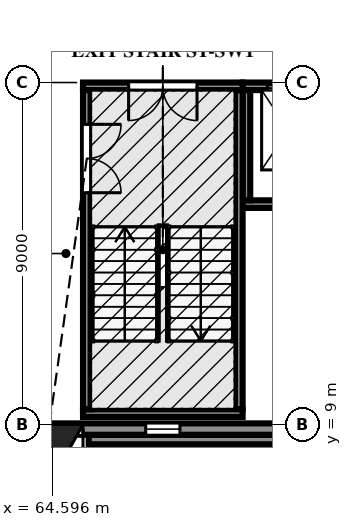
"""IFC4 building model, lengths in metres.
Left out: names, types, materials, properties, quantities, classifications, styles, units other than length and angle.
Written with IfcOpenShell. Run it as: python <this file> out.ifc"""

import sys

from ifc_helpers import new_model, si_unit, direction, frame, frame_2d, origin, place, context, subcontext, project, spatial, polyline, rectangle, outline, extrude, element, fill, save


model = new_model("IFC4")
c1 = context("Model", 3, precision=1e-05, world=origin(), true_north=direction((0.0, 1.0)))
c2 = subcontext(c1, "Body", "Model", "MODEL_VIEW")
j1 = project(units=[si_unit("LENGTHUNIT", "METRE"), si_unit("PLANEANGLEUNIT", "RADIAN")], contexts=[c1])
p1 = place(None, origin())
s1 = spatial("IfcSite", under=j1, at=p1, CompositionType="ELEMENT")
p2 = place(p1, origin())
s2 = spatial("IfcBuilding", under=s1, at=p2, CompositionType="ELEMENT")
p3 = place(p2, origin())
s3 = spatial("IfcBuildingStorey", under=s2, at=p3, CompositionType="ELEMENT", Elevation=0.0)
p4 = place(p3, frame((63.127, 8.88, 0.0), z_axis=(0.0, 0.0, 1.0), x_axis=(1.0, 0.0, 0.0)))
e1 = element("IfcWall", 1, at=p4, inside=s3, PredefinedType="SOLIDWALL", context=c2, shape_type="SweptSolid", body=[
    extrude(rectangle(XDim=8.746, YDim=0.3, at=frame_2d((4.373, 0.0))), origin(), (0.0, 0.0, 1.0), 6.767),
])
p5 = place(p4, frame((0.473, 0.0, 0.0)))
e2 = element("IfcOpeningElement", 2, at=p5, cuts=e1, PredefinedType="OPENING", context=c2, shape_type="SweptSolid", body=[
    extrude(rectangle(XDim=1.8, YDim=2.4, at=frame_2d((0.9, 1.2))), frame((0.0, 0.16, 0.0), z_axis=(0.0, -1.0, 0.0), x_axis=(1.0, 0.0, 0.0)), (0.0, 0.0, 1.0), 0.32),
])
p6 = place(p4, frame((0.773, 0.0, 2.55)))
e3 = element("IfcOpeningElement", 3, at=p6, cuts=e1, PredefinedType="OPENING", context=c2, shape_type="SweptSolid", body=[
    extrude(rectangle(XDim=1.2, YDim=0.6, at=frame_2d((0.6, 0.3))), frame((0.0, 0.16, 0.0), z_axis=(0.0, -1.0, 0.0), x_axis=(1.0, 0.0, 0.0)), (0.0, 0.0, 1.0), 0.32),
])
p7 = place(p4, frame((3.923, 0.0, 1.2)))
e4 = element("IfcOpeningElement", 4, at=p7, cuts=e1, PredefinedType="OPENING", context=c2, shape_type="SweptSolid", body=[
    extrude(rectangle(XDim=0.9, YDim=1.8, at=frame_2d((0.45, 0.9))), frame((0.0, 0.16, 0.0), z_axis=(0.0, -1.0, 0.0), x_axis=(1.0, 0.0, 0.0)), (0.0, 0.0, 1.0), 0.32),
])
p8 = place(p3, frame((65.55, 8.605, 0.0), z_axis=(0.0, 0.0, 1.0), x_axis=(1.0, 0.0, 0.0)))
e5 = element("IfcWall", 5, at=p8, inside=s3, PredefinedType="SOLIDWALL", context=c2, shape_type="SweptSolid", body=[
    extrude(outline(polyline([(0.0, 0.0), (6.577, 0.0), (6.577, 6.767), (0.0, 6.767), (0.0, 0.0)]), holes=[polyline([(1.35, 1.05), (1.35, 3.0), (1.374, 3.252), (1.47, 3.468), (1.554, 3.522), (1.626, 3.666), (1.782, 3.81), (1.95, 3.9), (2.118, 3.81), (2.274, 3.666), (2.346, 3.522), (2.43, 3.468), (2.526, 3.252), (2.55, 3.0), (2.55, 1.05), (1.35, 1.05)])]), frame((0.0, 0.125, 0.0), z_axis=(0.0, -1.0, 0.0), x_axis=(1.0, 0.0, 0.0)), (0.0, 0.0, 1.0), 0.25),
])
p9 = place(p3, frame((65.4, 9.3, 0.0), z_axis=(0.0, 0.0, 1.0), x_axis=(1.0, 0.0, 0.0)))
e6 = element("IfcWall", 6, at=p9, inside=s3, PredefinedType="SOLIDWALL", context=c2, shape_type="SweptSolid", body=[
    extrude(rectangle(XDim=4.2, YDim=0.2, at=frame_2d((2.1, 0.0))), origin(), (0.0, 0.0, 1.0), 6.757),
])
p10 = place(p3, frame((65.4, 17.9, 0.0), z_axis=(0.0, 0.0, 1.0), x_axis=(1.0, 0.0, 0.0)))
e7 = element("IfcWall", 7, at=p10, inside=s3, PredefinedType="SOLIDWALL", context=c2, shape_type="SweptSolid", body=[
    extrude(rectangle(XDim=4.2, YDim=0.2, at=frame_2d((2.1, 0.0))), origin(), (0.0, 0.0, 1.0), 6.757),
])
p11 = place(p10, frame((1.2, 0.0, 0.0)))
e8 = element("IfcOpeningElement", 8, at=p11, cuts=e7, PredefinedType="OPENING", context=c2, shape_type="SweptSolid", body=[
    extrude(rectangle(XDim=1.8, YDim=2.1, at=frame_2d((0.9, 1.05))), frame((0.0, 0.11, 0.0), z_axis=(0.0, -1.0, 0.0), x_axis=(1.0, 0.0, 0.0)), (0.0, 0.0, 1.0), 0.22),
])
p12 = place(p3, frame((65.5, 9.4, 0.0), z_axis=(0.0, 0.0, 1.0), x_axis=(0.0, 1.0, 0.0)))
e9 = element("IfcWall", 9, at=p12, inside=s3, PredefinedType="SOLIDWALL", context=c2, shape_type="SweptSolid", body=[
    extrude(rectangle(XDim=8.4, YDim=0.2, at=frame_2d((4.2, 0.0))), origin(), (0.0, 0.0, 1.0), 6.757),
])
p13 = place(p12, frame((5.7, 0.0, 0.0)))
e10 = element("IfcOpeningElement", 10, at=p13, cuts=e9, PredefinedType="OPENING", context=c2, shape_type="SweptSolid", body=[
    extrude(rectangle(XDim=1.8, YDim=2.1, at=frame_2d((0.9, 1.05))), frame((0.0, 0.11, 0.0), z_axis=(0.0, -1.0, 0.0), x_axis=(1.0, 0.0, 0.0)), (0.0, 0.0, 1.0), 0.22),
])
p14 = place(p3, frame((69.5, 9.4, 0.0), z_axis=(0.0, 0.0, 1.0), x_axis=(0.0, 1.0, 0.0)))
e11 = element("IfcWall", 11, at=p14, inside=s3, PredefinedType="SOLIDWALL", context=c2, shape_type="SweptSolid", body=[
    extrude(rectangle(XDim=8.4, YDim=0.2, at=frame_2d((4.2, 0.0))), origin(), (0.0, 0.0, 1.0), 6.757),
])
p15 = place(p3, frame((69.602, 14.8, -1.6), z_axis=(0.0, 0.0, 1.0), x_axis=(1.0, 0.0, 0.0)))
e12 = element("IfcWall", 12, at=p15, inside=s3, PredefinedType="SOLIDWALL", context=c2, shape_type="SweptSolid", body=[
    extrude(rectangle(XDim=2.398, YDim=0.2, at=frame_2d((1.199, 0.0))), origin(), (0.0, 0.0, 1.0), 8.357),
])
p16 = place(p3, frame((69.602, 17.9, -1.6), z_axis=(0.0, 0.0, 1.0), x_axis=(1.0, 0.0, 0.0)))
e13 = element("IfcWall", 13, at=p16, inside=s3, PredefinedType="SOLIDWALL", context=c2, shape_type="SweptSolid", body=[
    extrude(rectangle(XDim=2.398, YDim=0.2, at=frame_2d((1.199, 0.0))), origin(), (0.0, 0.0, 1.0), 8.357),
])
p17 = place(p16, frame((0.648, 0.0, 1.6)))
e14 = element("IfcOpeningElement", 14, at=p17, cuts=e13, PredefinedType="OPENING", context=c2, shape_type="SweptSolid", body=[
    extrude(rectangle(XDim=1.1, YDim=2.1, at=frame_2d((0.55, 1.05))), frame((0.0, 0.11, 0.0), z_axis=(0.0, -1.0, 0.0), x_axis=(1.0, 0.0, 0.0)), (0.0, 0.0, 1.0), 0.22),
])
p18 = place(p3, frame((69.7, 14.9, -1.6), z_axis=(0.0, 0.0, 1.0), x_axis=(0.0, 1.0, 0.0)))
e15 = element("IfcWall", 15, at=p18, inside=s3, PredefinedType="SOLIDWALL", context=c2, shape_type="SweptSolid", body=[
    extrude(rectangle(XDim=2.9, YDim=0.2, at=frame_2d((1.45, 0.0))), origin(), (0.0, 0.0, 1.0), 8.357),
])
p19 = place(p5, frame((1.8, 0.0, 0.0), z_axis=(0.0, 0.0, 1.0), x_axis=(-1.0, 0.0, 0.0)))
e16 = element("IfcDoor", 16, at=p19, inside=s3, OperationType="DOUBLE_DOOR_SINGLE_SWING", PredefinedType="DOOR", context=c2, shape_type="SweptSolid", body=[
    extrude(outline(polyline([(0.0, 0.0), (0.07, 0.0), (0.07, 2.33), (1.73, 2.33), (1.73, 0.0), (1.8, 0.0), (1.8, 2.4), (0.0, 2.4), (0.0, 0.0)])), frame((0.0, 0.025, 0.0), z_axis=(0.0, -1.0, 0.0), x_axis=(1.0, 0.0, 0.0)), (0.0, 0.0, 1.0), 0.05),
    extrude(outline(polyline([(0.074, 0.01), (0.897, 0.01), (0.897, 2.326), (0.074, 2.326), (0.074, 0.01)]), holes=[polyline([(0.194, 0.16), (0.777, 0.16), (0.777, 1.01), (0.194, 1.01), (0.194, 0.16)]), polyline([(0.335, 1.16), (0.635, 1.16), (0.635, 1.76), (0.335, 1.76), (0.335, 1.16)])]), frame((0.0, 0.017, 0.0), z_axis=(0.0, -1.0, 0.0), x_axis=(1.0, 0.0, 0.0)), (0.0, 0.0, 1.0), 0.035),
    extrude(rectangle(XDim=0.583, YDim=0.85, at=frame_2d((0.485, 0.585))), frame((0.0, 0.009, 0.0), z_axis=(0.0, -1.0, 0.0), x_axis=(1.0, 0.0, 0.0)), (0.0, 0.0, 1.0), 0.017),
    extrude(rectangle(XDim=0.3, YDim=0.6, at=frame_2d((0.485, 1.46))), frame((0.0, 0.006, 0.0), z_axis=(0.0, -1.0, 0.0), x_axis=(1.0, 0.0, 0.0)), (0.0, 0.0, 1.0), 0.012),
    extrude(outline(polyline([(0.903, 0.01), (1.726, 0.01), (1.726, 2.326), (0.903, 2.326), (0.903, 0.01)]), holes=[polyline([(1.023, 0.16), (1.606, 0.16), (1.606, 1.01), (1.023, 1.01), (1.023, 0.16)]), polyline([(1.165, 1.16), (1.465, 1.16), (1.465, 1.76), (1.165, 1.76), (1.165, 1.16)])]), frame((0.0, 0.017, 0.0), z_axis=(0.0, -1.0, 0.0), x_axis=(1.0, 0.0, 0.0)), (0.0, 0.0, 1.0), 0.035),
    extrude(rectangle(XDim=0.583, YDim=0.85, at=frame_2d((1.314, 0.585))), frame((0.0, 0.009, 0.0), z_axis=(0.0, -1.0, 0.0), x_axis=(1.0, 0.0, 0.0)), (0.0, 0.0, 1.0), 0.017),
    extrude(rectangle(XDim=0.3, YDim=0.6, at=frame_2d((1.314, 1.46))), frame((0.0, 0.006, 0.0), z_axis=(0.0, -1.0, 0.0), x_axis=(1.0, 0.0, 0.0)), (0.0, 0.0, 1.0), 0.012),
])
fill(e2, e16)
p20 = place(p6, origin())
e17 = element("IfcWindow", 17, at=p20, inside=s3, PartitioningType="SINGLE_PANEL", PredefinedType="WINDOW", context=c2, shape_type="SweptSolid", body=[
    extrude(outline(polyline([(0.0, 0.0), (1.2, 0.0), (1.2, 0.6), (0.0, 0.6), (0.0, 0.0)]), holes=[polyline([(0.07, 0.07), (1.13, 0.07), (1.13, 0.53), (0.07, 0.53), (0.07, 0.07)])]), frame((0.0, 0.03, 0.0), z_axis=(0.0, -1.0, 0.0), x_axis=(1.0, 0.0, 0.0)), (0.0, 0.0, 1.0), 0.06),
    extrude(outline(polyline([(0.07, 0.07), (1.13, 0.07), (1.13, 0.53), (0.07, 0.53), (0.07, 0.07)]), holes=[polyline([(0.1, 0.1), (1.1, 0.1), (1.1, 0.5), (0.1, 0.5), (0.1, 0.1)])]), frame((0.0, 0.022, 0.0), z_axis=(0.0, -1.0, 0.0), x_axis=(1.0, 0.0, 0.0)), (0.0, 0.0, 1.0), 0.045),
    extrude(rectangle(XDim=1.0, YDim=0.4, at=frame_2d((0.6, 0.3))), frame((0.0, 0.006, 0.0), z_axis=(0.0, -1.0, 0.0), x_axis=(1.0, 0.0, 0.0)), (0.0, 0.0, 1.0), 0.012),
])
fill(e3, e17)
p21 = place(p7, origin())
e18 = element("IfcWindow", 18, at=p21, inside=s3, PartitioningType="SINGLE_PANEL", PredefinedType="WINDOW", context=c2, shape_type="SweptSolid", body=[
    extrude(outline(polyline([(0.0, 0.0), (0.9, 0.0), (0.9, 1.235), (0.896, 1.3), (0.885, 1.364), (0.867, 1.426), (0.843, 1.486), (0.811, 1.543), (0.774, 1.596), (0.73, 1.645), (0.682, 1.688), (0.629, 1.726), (0.572, 1.757), (0.512, 1.782), (0.45, 1.8), (0.387, 1.782), (0.328, 1.757), (0.271, 1.726), (0.218, 1.688), (0.169, 1.645), (0.126, 1.596), (0.089, 1.543), (0.057, 1.486), (0.032, 1.426), (0.014, 1.364), (0.004, 1.3), (0.0, 1.235), (0.0, 0.0)]), holes=[polyline([(0.07, 0.07), (0.83, 0.07), (0.83, 1.235), (0.827, 1.291), (0.818, 1.346), (0.803, 1.4), (0.782, 1.451), (0.755, 1.501), (0.724, 1.547), (0.688, 1.589), (0.647, 1.627), (0.602, 1.661), (0.554, 1.689), (0.503, 1.713), (0.45, 1.73), (0.397, 1.713), (0.346, 1.689), (0.298, 1.661), (0.253, 1.627), (0.212, 1.589), (0.176, 1.547), (0.145, 1.501), (0.118, 1.451), (0.097, 1.4), (0.082, 1.346), (0.073, 1.291), (0.07, 1.235), (0.07, 0.07)])]), frame((0.0, 0.03, 0.0), z_axis=(0.0, -1.0, 0.0), x_axis=(1.0, 0.0, 0.0)), (0.0, 0.0, 1.0), 0.06),
    extrude(outline(polyline([(0.0, 1.235), (0.004, 1.3), (0.014, 1.364), (0.032, 1.426), (0.057, 1.486), (0.089, 1.543), (0.126, 1.596), (0.169, 1.645), (0.218, 1.688), (0.271, 1.726), (0.328, 1.757), (0.387, 1.782), (0.45, 1.8), (0.0, 1.8), (0.0, 1.235)])), frame((0.0, 0.028, 0.0), z_axis=(0.0, -1.0, 0.0), x_axis=(1.0, 0.0, 0.0)), (0.0, 0.0, 1.0), 0.056),
    extrude(outline(polyline([(0.45, 1.8), (0.512, 1.782), (0.572, 1.757), (0.629, 1.726), (0.682, 1.688), (0.73, 1.645), (0.774, 1.596), (0.811, 1.543), (0.843, 1.486), (0.867, 1.426), (0.885, 1.364), (0.896, 1.3), (0.9, 1.235), (0.9, 1.8), (0.45, 1.8)])), frame((0.0, 0.027, 0.0), z_axis=(0.0, -1.0, 0.0), x_axis=(1.0, 0.0, 0.0)), (0.0, 0.0, 1.0), 0.054),
    extrude(outline(polyline([(0.828, 1.275), (0.072, 1.275), (0.07, 1.235), (0.07, 1.195), (0.83, 1.195), (0.83, 1.235), (0.828, 1.275)])), frame((0.0, 0.021, 0.0), z_axis=(0.0, -1.0, 0.0), x_axis=(1.0, 0.0, 0.0)), (0.0, 0.0, 1.0), 0.042),
    extrude(outline(polyline([(0.07, 0.07), (0.83, 0.07), (0.83, 1.195), (0.07, 1.195), (0.07, 0.07)]), holes=[polyline([(0.1, 0.1), (0.8, 0.1), (0.8, 1.165), (0.1, 1.165), (0.1, 0.1)])]), frame((0.0, 0.022, 0.0), z_axis=(0.0, -1.0, 0.0), x_axis=(1.0, 0.0, 0.0)), (0.0, 0.0, 1.0), 0.045),
    extrude(rectangle(XDim=0.7, YDim=1.065, at=frame_2d((0.45, 0.632))), frame((0.0, 0.006, 0.0), z_axis=(0.0, -1.0, 0.0), x_axis=(1.0, 0.0, 0.0)), (0.0, 0.0, 1.0), 0.012),
    extrude(outline(polyline([(0.072, 1.275), (0.828, 1.275), (0.827, 1.291), (0.818, 1.346), (0.803, 1.4), (0.782, 1.451), (0.755, 1.501), (0.724, 1.547), (0.688, 1.589), (0.647, 1.627), (0.602, 1.661), (0.554, 1.689), (0.503, 1.713), (0.45, 1.73), (0.397, 1.713), (0.346, 1.689), (0.298, 1.661), (0.253, 1.627), (0.212, 1.589), (0.176, 1.547), (0.145, 1.501), (0.118, 1.451), (0.097, 1.4), (0.082, 1.346), (0.073, 1.291), (0.072, 1.275)]), holes=[polyline([(0.112, 1.31), (0.116, 1.338), (0.13, 1.388), (0.15, 1.437), (0.175, 1.483), (0.204, 1.526), (0.238, 1.565), (0.276, 1.601), (0.317, 1.632), (0.362, 1.658), (0.409, 1.68), (0.45, 1.693), (0.49, 1.68), (0.538, 1.658), (0.583, 1.632), (0.624, 1.601), (0.662, 1.565), (0.696, 1.526), (0.725, 1.483), (0.75, 1.437), (0.77, 1.388), (0.783, 1.338), (0.788, 1.31), (0.112, 1.31)])]), frame((0.0, 0.022, 0.0), z_axis=(0.0, -1.0, 0.0), x_axis=(1.0, 0.0, 0.0)), (0.0, 0.0, 1.0), 0.045),
    extrude(outline(polyline([(0.788, 1.31), (0.783, 1.338), (0.77, 1.388), (0.75, 1.437), (0.725, 1.483), (0.696, 1.526), (0.662, 1.565), (0.624, 1.601), (0.583, 1.632), (0.538, 1.658), (0.49, 1.68), (0.45, 1.693), (0.409, 1.68), (0.362, 1.658), (0.317, 1.632), (0.276, 1.601), (0.238, 1.565), (0.204, 1.526), (0.175, 1.483), (0.15, 1.437), (0.13, 1.388), (0.116, 1.338), (0.112, 1.31), (0.788, 1.31)])), frame((0.0, 0.006, 0.0), z_axis=(0.0, -1.0, 0.0), x_axis=(1.0, 0.0, 0.0)), (0.0, 0.0, 1.0), 0.012),
])
fill(e4, e18)
p22 = place(p17, origin())
e19 = element("IfcDoor", 19, at=p22, inside=s3, OperationType="SLIDING_TO_LEFT", PredefinedType="DOOR", context=c2, shape_type="SweptSolid", body=[
    extrude(outline(polyline([(0.0, 0.0), (0.07, 0.0), (0.07, 2.03), (1.03, 2.03), (1.03, 0.0), (1.1, 0.0), (1.1, 2.1), (0.0, 2.1), (0.0, 0.0)])), frame((0.0, 0.025, 0.0), z_axis=(0.0, -1.0, 0.0), x_axis=(1.0, 0.0, 0.0)), (0.0, 0.0, 1.0), 0.05),
    extrude(rectangle(XDim=0.524, YDim=2.016, at=frame_2d((0.336, 1.018))), frame((0.0, 0.018, 0.0), z_axis=(0.0, -1.0, 0.0), x_axis=(1.0, 0.0, 0.0)), (0.0, 0.0, 1.0), 0.016),
    extrude(rectangle(XDim=0.52, YDim=2.016, at=frame_2d((0.766, 1.018))), frame((0.0, -0.002, 0.0), z_axis=(0.0, -1.0, 0.0), x_axis=(1.0, 0.0, 0.0)), (0.0, 0.0, 1.0), 0.016),
])
fill(e14, e19)
p23 = place(p13, frame((1.8, 0.0, 0.0), z_axis=(0.0, 0.0, 1.0), x_axis=(-1.0, 0.0, 0.0)))
e20 = element("IfcDoor", 20, at=p23, inside=s3, OperationType="DOUBLE_DOOR_SINGLE_SWING", PredefinedType="DOOR", context=c2, shape_type="SweptSolid", body=[
    extrude(outline(polyline([(0.0, 0.0), (0.07, 0.0), (0.07, 2.03), (1.73, 2.03), (1.73, 0.0), (1.8, 0.0), (1.8, 2.1), (0.0, 2.1), (0.0, 0.0)])), frame((0.0, 0.025, 0.0), z_axis=(0.0, -1.0, 0.0), x_axis=(1.0, 0.0, 0.0)), (0.0, 0.0, 1.0), 0.05),
    extrude(outline(polyline([(0.074, 0.01), (0.897, 0.01), (0.897, 2.026), (0.074, 2.026), (0.074, 0.01)]), holes=[polyline([(0.194, 0.16), (0.777, 0.16), (0.777, 1.01), (0.194, 1.01), (0.194, 0.16)]), polyline([(0.335, 1.16), (0.635, 1.16), (0.635, 1.76), (0.335, 1.76), (0.335, 1.16)])]), frame((0.0, 0.017, 0.0), z_axis=(0.0, -1.0, 0.0), x_axis=(1.0, 0.0, 0.0)), (0.0, 0.0, 1.0), 0.035),
    extrude(rectangle(XDim=0.583, YDim=0.85, at=frame_2d((0.485, 0.585))), frame((0.0, 0.009, 0.0), z_axis=(0.0, -1.0, 0.0), x_axis=(1.0, 0.0, 0.0)), (0.0, 0.0, 1.0), 0.017),
    extrude(rectangle(XDim=0.3, YDim=0.6, at=frame_2d((0.485, 1.46))), frame((0.0, 0.006, 0.0), z_axis=(0.0, -1.0, 0.0), x_axis=(1.0, 0.0, 0.0)), (0.0, 0.0, 1.0), 0.012),
    extrude(outline(polyline([(0.903, 0.01), (1.726, 0.01), (1.726, 2.026), (0.903, 2.026), (0.903, 0.01)]), holes=[polyline([(1.023, 0.16), (1.606, 0.16), (1.606, 1.01), (1.023, 1.01), (1.023, 0.16)]), polyline([(1.165, 1.16), (1.465, 1.16), (1.465, 1.76), (1.165, 1.76), (1.165, 1.16)])]), frame((0.0, 0.017, 0.0), z_axis=(0.0, -1.0, 0.0), x_axis=(1.0, 0.0, 0.0)), (0.0, 0.0, 1.0), 0.035),
    extrude(rectangle(XDim=0.583, YDim=0.85, at=frame_2d((1.314, 0.585))), frame((0.0, 0.009, 0.0), z_axis=(0.0, -1.0, 0.0), x_axis=(1.0, 0.0, 0.0)), (0.0, 0.0, 1.0), 0.017),
    extrude(rectangle(XDim=0.3, YDim=0.6, at=frame_2d((1.314, 1.46))), frame((0.0, 0.006, 0.0), z_axis=(0.0, -1.0, 0.0), x_axis=(1.0, 0.0, 0.0)), (0.0, 0.0, 1.0), 0.012),
])
fill(e10, e20)
p24 = place(p11, frame((1.8, 0.0, 0.0), z_axis=(0.0, 0.0, 1.0), x_axis=(-1.0, 0.0, 0.0)))
e21 = element("IfcDoor", 21, at=p24, inside=s3, OperationType="DOUBLE_DOOR_SINGLE_SWING", PredefinedType="DOOR", context=c2, shape_type="SweptSolid", body=[
    extrude(outline(polyline([(0.0, 0.0), (0.07, 0.0), (0.07, 2.03), (1.73, 2.03), (1.73, 0.0), (1.8, 0.0), (1.8, 2.1), (0.0, 2.1), (0.0, 0.0)])), frame((0.0, 0.025, 0.0), z_axis=(0.0, -1.0, 0.0), x_axis=(1.0, 0.0, 0.0)), (0.0, 0.0, 1.0), 0.05),
    extrude(outline(polyline([(0.074, 0.01), (0.897, 0.01), (0.897, 2.026), (0.074, 2.026), (0.074, 0.01)]), holes=[polyline([(0.194, 0.16), (0.777, 0.16), (0.777, 1.01), (0.194, 1.01), (0.194, 0.16)]), polyline([(0.335, 1.16), (0.635, 1.16), (0.635, 1.76), (0.335, 1.76), (0.335, 1.16)])]), frame((0.0, 0.017, 0.0), z_axis=(0.0, -1.0, 0.0), x_axis=(1.0, 0.0, 0.0)), (0.0, 0.0, 1.0), 0.035),
    extrude(rectangle(XDim=0.583, YDim=0.85, at=frame_2d((0.485, 0.585))), frame((0.0, 0.009, 0.0), z_axis=(0.0, -1.0, 0.0), x_axis=(1.0, 0.0, 0.0)), (0.0, 0.0, 1.0), 0.017),
    extrude(rectangle(XDim=0.3, YDim=0.6, at=frame_2d((0.485, 1.46))), frame((0.0, 0.006, 0.0), z_axis=(0.0, -1.0, 0.0), x_axis=(1.0, 0.0, 0.0)), (0.0, 0.0, 1.0), 0.012),
    extrude(outline(polyline([(0.903, 0.01), (1.726, 0.01), (1.726, 2.026), (0.903, 2.026), (0.903, 0.01)]), holes=[polyline([(1.023, 0.16), (1.606, 0.16), (1.606, 1.01), (1.023, 1.01), (1.023, 0.16)]), polyline([(1.165, 1.16), (1.465, 1.16), (1.465, 1.76), (1.165, 1.76), (1.165, 1.16)])]), frame((0.0, 0.017, 0.0), z_axis=(0.0, -1.0, 0.0), x_axis=(1.0, 0.0, 0.0)), (0.0, 0.0, 1.0), 0.035),
    extrude(rectangle(XDim=0.583, YDim=0.85, at=frame_2d((1.314, 0.585))), frame((0.0, 0.009, 0.0), z_axis=(0.0, -1.0, 0.0), x_axis=(1.0, 0.0, 0.0)), (0.0, 0.0, 1.0), 0.017),
    extrude(rectangle(XDim=0.3, YDim=0.6, at=frame_2d((1.314, 1.46))), frame((0.0, 0.006, 0.0), z_axis=(0.0, -1.0, 0.0), x_axis=(1.0, 0.0, 0.0)), (0.0, 0.0, 1.0), 0.012),
])
fill(e8, e21)
save(model, sys.argv[1])
